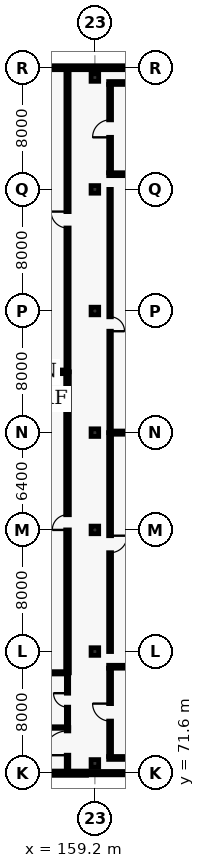
"""IFC4 building model, lengths in metres.
Left out: names, types, materials, properties, quantities, classifications, styles, units other than length and angle.
Written with IfcOpenShell. Run it as: python <this file> out.ifc"""

import sys

from ifc_helpers import new_model, si_unit, direction, frame, frame_2d, origin, origin_2d, place, context, subcontext, project, spatial, rectangle, extrude, element, fill, save


model = new_model("IFC4")
c1 = context("Model", 3, precision=1e-05, world=origin(), true_north=direction((0.0, 1.0)))
c2 = subcontext(c1, "Body", "Model", "MODEL_VIEW")
j1 = project(units=[si_unit("LENGTHUNIT", "METRE"), si_unit("PLANEANGLEUNIT", "RADIAN")], contexts=[c1])
p1 = place(None, origin())
s1 = spatial("IfcSite", under=j1, at=p1, CompositionType="ELEMENT")
p2 = place(p1, origin())
s2 = spatial("IfcBuilding", under=s1, at=p2, CompositionType="ELEMENT")
p3 = place(p2, frame((0.0, 0.0, 29.4)))
s3 = spatial("IfcBuildingStorey", under=s2, at=p3, CompositionType="ELEMENT", Elevation=29.4)
for number, where, z_axis, x_axis in (
    (1, (159.2, 72.24, 0.0), (0.0, 0.0, 1.0), (1.0, 0.0, 0.0)),
    (2, (159.2, 79.6, 0.0), (0.0, 0.0, 1.0), (1.0, 0.0, 0.0)),
    (3, (159.2, 87.6, 0.0), (0.0, 0.0, 1.0), (1.0, 0.0, 0.0)),
    (4, (159.2, 94.0, 0.0), (0.0, 0.0, 1.0), (1.0, 0.0, 0.0)),
    (5, (159.2, 102.0, 0.0), (0.0, 0.0, 1.0), (1.0, 0.0, 0.0)),
    (6, (159.2, 110.0, 0.0), (0.0, 0.0, 1.0), (1.0, 0.0, 0.0)),
    (7, (159.2, 117.36, 0.0), (0.0, 0.0, 1.0), (1.0, 0.0, 0.0)),
):
    element("IfcColumn", number, at=place(p3, frame(where, z_axis=z_axis, x_axis=x_axis)), inside=s3, PredefinedType="COLUMN", context=c2, shape_type="SweptSolid", body=[
        extrude(rectangle(XDim=0.5, YDim=0.5, at=origin_2d()), origin(), (0.0, 0.0, 1.0), 4.5),
    ])
p4 = place(p3, frame((152.8, 118.0, 0.0), z_axis=(0.0, 0.0, 1.0), x_axis=(1.0, 0.0, 0.0)))
e8 = element("IfcWall", 8, at=p4, inside=s3, PredefinedType="SOLIDWALL", context=c2, shape_type="SweptSolid", body=[
    extrude(rectangle(XDim=19.2, YDim=0.25, at=frame_2d((9.6, 0.0))), origin(), (0.0, 0.0, 1.0), 4.255),
])
p5 = place(p4, frame((0.75, 0.0, 0.9)))
e9 = element("IfcOpeningElement", 9, at=p5, cuts=e8, PredefinedType="OPENING", context=c2, shape_type="SweptSolid", body=[
    extrude(rectangle(XDim=1.6, YDim=1.65, at=frame_2d((0.8, 0.825))), frame((0.0, 0.135, 0.0), z_axis=(0.0, -1.0, 0.0), x_axis=(1.0, 0.0, 0.0)), (0.0, 0.0, 1.0), 0.27),
])
p6 = place(p4, frame((10.0, 0.0, 0.9)))
e10 = element("IfcOpeningElement", 10, at=p6, cuts=e8, PredefinedType="OPENING", context=c2, shape_type="SweptSolid", body=[
    extrude(rectangle(XDim=1.4, YDim=2.1, at=frame_2d((0.7, 1.05))), frame((0.0, 0.135, 0.0), z_axis=(0.0, -1.0, 0.0), x_axis=(1.0, 0.0, 0.0)), (0.0, 0.0, 1.0), 0.27),
])
p7 = place(p3, frame((172.0, 71.6, 0.0), z_axis=(0.0, 0.0, 1.0), x_axis=(-1.0, 0.0, 0.0)))
e11 = element("IfcWall", 11, at=p7, inside=s3, PredefinedType="SOLIDWALL", context=c2, shape_type="SweptSolid", body=[
    extrude(rectangle(XDim=19.2, YDim=0.275, at=frame_2d((9.6, 0.0))), origin(), (0.0, 0.0, 1.0), 4.255),
])
p8 = place(p7, frame((10.0, 0.0, 0.8)))
e12 = element("IfcOpeningElement", 12, at=p8, cuts=e11, PredefinedType="OPENING", context=c2, shape_type="SweptSolid", body=[
    extrude(rectangle(XDim=3.35, YDim=2.9, at=frame_2d((1.675, 1.45))), frame((0.0, 0.147, 0.0), z_axis=(0.0, -1.0, 0.0), x_axis=(1.0, 0.0, 0.0)), (0.0, 0.0, 1.0), 0.295),
])
for number, where, z_axis, x_axis in (
    (13, (152.8, 118.0, 4.5), (0.0, 0.0, 1.0), (1.0, 0.0, 0.0)),
    (14, (172.0, 71.6, 4.5), (0.0, 0.0, 1.0), (-1.0, 0.0, 0.0)),
):
    element("IfcWall", number, at=place(p3, frame(where, z_axis=z_axis, x_axis=x_axis)), inside=s3, PredefinedType="PARAPET", context=c2, shape_type="SweptSolid", body=[
        extrude(rectangle(XDim=19.2, YDim=0.22, at=frame_2d((9.6, 0.0))), origin(), (0.0, 0.0, 1.0), 0.95),
    ])
p9 = place(p3, frame((160.105, 72.6, 0.0), z_axis=(0.0, 0.0, 1.0), x_axis=(1.0, 0.0, 0.0)))
e15 = element("IfcWall", 15, at=p9, inside=s3, PredefinedType="PARTITIONING", context=c2, shape_type="SweptSolid", body=[
    extrude(rectangle(XDim=4.495, YDim=0.19, at=frame_2d((2.248, 0.0))), origin(), (0.0, 0.0, 1.0), 3.605),
])
p10 = place(p3, frame((160.105, 78.6, 0.0), z_axis=(0.0, 0.0, 1.0), x_axis=(1.0, 0.0, 0.0)))
e16 = element("IfcWall", 16, at=p10, inside=s3, PredefinedType="PARTITIONING", context=c2, shape_type="SweptSolid", body=[
    extrude(rectangle(XDim=4.495, YDim=0.19, at=frame_2d((2.248, 0.0))), origin(), (0.0, 0.0, 1.0), 4.255),
])
p11 = place(p3, frame((160.2, 72.695, 0.0), z_axis=(0.0, 0.0, 1.0), x_axis=(0.0, 1.0, 0.0)))
e17 = element("IfcWall", 17, at=p11, inside=s3, PredefinedType="PARTITIONING", context=c2, shape_type="SweptSolid", body=[
    extrude(rectangle(XDim=5.81, YDim=0.19, at=frame_2d((2.905, 0.0))), origin(), (0.0, 0.0, 1.0), 4.255),
])
p12 = place(p11, frame((2.33, 0.0, 0.0)))
e18 = element("IfcOpeningElement", 18, at=p12, cuts=e17, PredefinedType="OPENING", context=c2, shape_type="SweptSolid", body=[
    extrude(rectangle(XDim=1.15, YDim=2.2, at=frame_2d((0.575, 1.1))), frame((0.0, 0.105, 0.0), z_axis=(0.0, -1.0, 0.0), x_axis=(1.0, 0.0, 0.0)), (0.0, 0.0, 1.0), 0.21),
])
p13 = place(p3, frame((160.105, 111.0, 0.0), z_axis=(0.0, 0.0, 1.0), x_axis=(1.0, 0.0, 0.0)))
e19 = element("IfcWall", 19, at=p13, inside=s3, PredefinedType="PARTITIONING", context=c2, shape_type="SweptSolid", body=[
    extrude(rectangle(XDim=4.495, YDim=0.19, at=frame_2d((2.248, 0.0))), origin(), (0.0, 0.0, 1.0), 4.255),
])
p14 = place(p3, frame((160.105, 117.0, 0.0), z_axis=(0.0, 0.0, 1.0), x_axis=(1.0, 0.0, 0.0)))
e20 = element("IfcWall", 20, at=p14, inside=s3, PredefinedType="PARTITIONING", context=c2, shape_type="SweptSolid", body=[
    extrude(rectangle(XDim=4.495, YDim=0.19, at=frame_2d((2.248, 0.0))), origin(), (0.0, 0.0, 1.0), 3.605),
])
p15 = place(p3, frame((160.2, 111.095, 0.0), z_axis=(0.0, 0.0, 1.0), x_axis=(0.0, 1.0, 0.0)))
e21 = element("IfcWall", 21, at=p15, inside=s3, PredefinedType="PARTITIONING", context=c2, shape_type="SweptSolid", body=[
    extrude(rectangle(XDim=5.81, YDim=0.19, at=frame_2d((2.905, 0.0))), origin(), (0.0, 0.0, 1.0), 4.255),
])
p16 = place(p15, frame((2.33, 0.0, 0.0)))
e22 = element("IfcOpeningElement", 22, at=p16, cuts=e21, PredefinedType="OPENING", context=c2, shape_type="SweptSolid", body=[
    extrude(rectangle(XDim=1.15, YDim=2.2, at=frame_2d((0.575, 1.1))), frame((0.0, 0.105, 0.0), z_axis=(0.0, -1.0, 0.0), x_axis=(1.0, 0.0, 0.0)), (0.0, 0.0, 1.0), 0.21),
])
p17 = place(p3, frame((157.4, 71.6, 0.0), z_axis=(0.0, 0.0, 1.0), x_axis=(0.0, 1.0, 0.0)))
e23 = element("IfcWall", 23, at=p17, inside=s3, PredefinedType="PARTITIONING", context=c2, shape_type="SweptSolid", body=[
    extrude(rectangle(XDim=3.0, YDim=0.165, at=frame_2d((1.5, 0.0))), origin(), (0.0, 0.0, 1.0), 4.255),
])
p18 = place(p17, frame((1.18, 0.0, 0.0)))
e24 = element("IfcOpeningElement", 24, at=p18, cuts=e23, PredefinedType="OPENING", context=c2, shape_type="SweptSolid", body=[
    extrude(rectangle(XDim=1.6, YDim=2.3, at=frame_2d((0.8, 1.15))), frame((0.0, 0.093, 0.0), z_axis=(0.0, -1.0, 0.0), x_axis=(1.0, 0.0, 0.0)), (0.0, 0.0, 1.0), 0.185),
])
p19 = place(p3, frame((157.4, 74.6, 0.0), z_axis=(0.0, 0.0, 1.0), x_axis=(0.0, 1.0, 0.0)))
e25 = element("IfcWall", 25, at=p19, inside=s3, PredefinedType="PARTITIONING", context=c2, shape_type="SweptSolid", body=[
    extrude(rectangle(XDim=3.6, YDim=0.15, at=frame_2d((1.8, 0.0))), origin(), (0.0, 0.0, 1.0), 4.255),
])
p20 = place(p19, frame((1.34, 0.0, 0.0)))
e26 = element("IfcOpeningElement", 26, at=p20, cuts=e25, PredefinedType="OPENING", context=c2, shape_type="SweptSolid", body=[
    extrude(rectangle(XDim=0.92, YDim=2.1, at=frame_2d((0.46, 1.05))), frame((0.0, 0.085, 0.0), z_axis=(0.0, -1.0, 0.0), x_axis=(1.0, 0.0, 0.0)), (0.0, 0.0, 1.0), 0.17),
])
p21 = place(p3, frame((157.4, 78.2, 0.0), z_axis=(0.0, 0.0, 1.0), x_axis=(0.0, 1.0, 0.0)))
e27 = element("IfcWall", 27, at=p21, inside=s3, PredefinedType="PARTITIONING", context=c2, shape_type="SweptSolid", body=[
    extrude(rectangle(XDim=19.8, YDim=0.24, at=frame_2d((9.9, 0.0))), origin(), (0.0, 0.0, 1.0), 4.255),
])
p22 = place(p21, frame((9.4, 0.0, 0.0)))
e28 = element("IfcOpeningElement", 28, at=p22, cuts=e27, PredefinedType="OPENING", context=c2, shape_type="SweptSolid", body=[
    extrude(rectangle(XDim=1.0, YDim=2.1, at=frame_2d((0.5, 1.05))), frame((0.0, 0.13, 0.0), z_axis=(0.0, -1.0, 0.0), x_axis=(1.0, 0.0, 0.0)), (0.0, 0.0, 1.0), 0.26),
])
p23 = place(p3, frame((157.4, 98.0, 0.0), z_axis=(0.0, 0.0, 1.0), x_axis=(0.0, 1.0, 0.0)))
e29 = element("IfcWall", 29, at=p23, inside=s3, PredefinedType="PARTITIONING", context=c2, shape_type="SweptSolid", body=[
    extrude(rectangle(XDim=20.0, YDim=0.21, at=frame_2d((10.0, 0.0))), origin(), (0.0, 0.0, 1.0), 4.255),
])
p24 = place(p23, frame((9.46, 0.0, 0.0)))
e30 = element("IfcOpeningElement", 30, at=p24, cuts=e29, PredefinedType="OPENING", context=c2, shape_type="SweptSolid", body=[
    extrude(rectangle(XDim=1.08, YDim=2.15, at=frame_2d((0.54, 1.075))), frame((0.0, 0.115, 0.0), z_axis=(0.0, -1.0, 0.0), x_axis=(1.0, 0.0, 0.0)), (0.0, 0.0, 1.0), 0.23),
])
p25 = place(p3, frame((160.2, 94.0, 0.0), z_axis=(0.0, 0.0, 1.0), x_axis=(0.0, -1.0, 0.0)))
e31 = element("IfcWall", 31, at=p25, inside=s3, PredefinedType="PARTITIONING", context=c2, shape_type="SweptSolid", body=[
    extrude(rectangle(XDim=14.4, YDim=0.19, at=frame_2d((7.2, 0.0))), origin(), (0.0, 0.0, 1.0), 4.255),
])
p26 = place(p25, frame((6.78, 0.0, 0.0)))
e32 = element("IfcOpeningElement", 32, at=p26, cuts=e31, PredefinedType="OPENING", context=c2, shape_type="SweptSolid", body=[
    extrude(rectangle(XDim=1.12, YDim=2.15, at=frame_2d((0.56, 1.075))), frame((0.0, 0.105, 0.0), z_axis=(0.0, -1.0, 0.0), x_axis=(1.0, 0.0, 0.0)), (0.0, 0.0, 1.0), 0.21),
])
p27 = place(p3, frame((160.2, 110.0, 0.0), z_axis=(0.0, 0.0, 1.0), x_axis=(0.0, -1.0, 0.0)))
e33 = element("IfcWall", 33, at=p27, inside=s3, PredefinedType="PARTITIONING", context=c2, shape_type="SweptSolid", body=[
    extrude(rectangle(XDim=16.0, YDim=0.165, at=frame_2d((8.0, 0.0))), origin(), (0.0, 0.0, 1.0), 4.255),
])
p28 = place(p27, frame((8.38, 0.0, 0.0)))
e34 = element("IfcOpeningElement", 34, at=p28, cuts=e33, PredefinedType="OPENING", context=c2, shape_type="SweptSolid", body=[
    extrude(rectangle(XDim=0.95, YDim=2.1, at=frame_2d((0.475, 1.05))), frame((0.0, 0.093, 0.0), z_axis=(0.0, -1.0, 0.0), x_axis=(1.0, 0.0, 0.0)), (0.0, 0.0, 1.0), 0.185),
])
p29 = place(p3, frame((154.2, 74.6, 0.0), z_axis=(0.0, 0.0, 1.0), x_axis=(1.0, 0.0, 0.0)))
e35 = element("IfcWall", 35, at=p29, inside=s3, PredefinedType="PARTITIONING", context=c2, shape_type="SweptSolid", body=[
    extrude(rectangle(XDim=3.2, YDim=0.1, at=frame_2d((1.6, 0.0))), origin(), (0.0, 0.0, 1.0), 4.255),
])
p30 = place(p3, frame((152.8, 78.2, 0.0), z_axis=(0.0, 0.0, 1.0), x_axis=(1.0, 0.0, 0.0)))
e36 = element("IfcWall", 36, at=p30, inside=s3, PredefinedType="PARTITIONING", context=c2, shape_type="SweptSolid", body=[
    extrude(rectangle(XDim=4.6, YDim=0.15, at=frame_2d((2.3, 0.0))), origin(), (0.0, 0.0, 1.0), 4.255),
])
p31 = place(p3, frame((152.8, 98.0, 0.0), z_axis=(0.0, 0.0, 1.0), x_axis=(1.0, 0.0, 0.0)))
e37 = element("IfcWall", 37, at=p31, inside=s3, PredefinedType="PARTITIONING", context=c2, shape_type="SweptSolid", body=[
    extrude(rectangle(XDim=4.6, YDim=0.24, at=frame_2d((2.3, 0.0))), origin(), (0.0, 0.0, 1.0), 4.255),
])
p32 = place(p3, frame((160.2, 94.0, 0.0), z_axis=(0.0, 0.0, 1.0), x_axis=(1.0, 0.0, 0.0)))
e38 = element("IfcWall", 38, at=p32, inside=s3, PredefinedType="PARTITIONING", context=c2, shape_type="SweptSolid", body=[
    extrude(rectangle(XDim=4.148, YDim=0.21, at=frame_2d((2.074, 0.0))), origin(), (0.0, 0.0, 1.0), 3.605),
])
p33 = place(p8, origin())
e39 = element("IfcWindow", 39, at=p33, inside=s3, PartitioningType="SINGLE_PANEL", PredefinedType="WINDOW", context=c2, shape_type="SweptSolid", body=[
    extrude(rectangle(XDim=3.35, YDim=2.9, at=frame_2d((1.675, 1.45))), frame((0.0, 0.03, 0.0), z_axis=(0.0, -1.0, 0.0), x_axis=(1.0, 0.0, 0.0)), (0.0, 0.0, 1.0), 0.06),
])
fill(e12, e39)
p34 = place(p12, origin())
e40 = element("IfcDoor", 40, at=p34, inside=s3, OperationType="SINGLE_SWING_RIGHT", PredefinedType="DOOR", context=c2, shape_type="SweptSolid", body=[
    extrude(rectangle(XDim=1.15, YDim=2.2, at=frame_2d((0.575, 1.1))), frame((0.0, 0.025, 0.0), z_axis=(0.0, -1.0, 0.0), x_axis=(1.0, 0.0, 0.0)), (0.0, 0.0, 1.0), 0.05),
])
fill(e18, e40)
p35 = place(p16, origin())
e41 = element("IfcDoor", 41, at=p35, inside=s3, OperationType="SINGLE_SWING_LEFT", PredefinedType="DOOR", context=c2, shape_type="SweptSolid", body=[
    extrude(rectangle(XDim=1.15, YDim=2.2, at=frame_2d((0.575, 1.1))), frame((0.0, 0.025, 0.0), z_axis=(0.0, -1.0, 0.0), x_axis=(1.0, 0.0, 0.0)), (0.0, 0.0, 1.0), 0.05),
])
fill(e22, e41)
p36 = place(p18, origin())
e42 = element("IfcDoor", 42, at=p36, inside=s3, OperationType="SINGLE_SWING_LEFT", PredefinedType="DOOR", context=c2, shape_type="SweptSolid", body=[
    extrude(rectangle(XDim=1.6, YDim=2.3, at=frame_2d((0.8, 1.15))), frame((0.0, 0.025, 0.0), z_axis=(0.0, -1.0, 0.0), x_axis=(1.0, 0.0, 0.0)), (0.0, 0.0, 1.0), 0.05),
])
fill(e24, e42)
p37 = place(p20, origin())
e43 = element("IfcDoor", 43, at=p37, inside=s3, OperationType="SINGLE_SWING_RIGHT", PredefinedType="DOOR", context=c2, shape_type="SweptSolid", body=[
    extrude(rectangle(XDim=0.92, YDim=2.1, at=frame_2d((0.46, 1.05))), frame((0.0, 0.025, 0.0), z_axis=(0.0, -1.0, 0.0), x_axis=(1.0, 0.0, 0.0)), (0.0, 0.0, 1.0), 0.05),
])
fill(e26, e43)
p38 = place(p22, origin())
e44 = element("IfcDoor", 44, at=p38, inside=s3, OperationType="SINGLE_SWING_LEFT", PredefinedType="DOOR", context=c2, shape_type="SweptSolid", body=[
    extrude(rectangle(XDim=1.0, YDim=2.1, at=frame_2d((0.5, 1.05))), frame((0.0, 0.025, 0.0), z_axis=(0.0, -1.0, 0.0), x_axis=(1.0, 0.0, 0.0)), (0.0, 0.0, 1.0), 0.05),
])
fill(e28, e44)
p39 = place(p24, origin())
e45 = element("IfcDoor", 45, at=p39, inside=s3, OperationType="SINGLE_SWING_RIGHT", PredefinedType="DOOR", context=c2, shape_type="SweptSolid", body=[
    extrude(rectangle(XDim=1.08, YDim=2.15, at=frame_2d((0.54, 1.075))), frame((0.0, 0.025, 0.0), z_axis=(0.0, -1.0, 0.0), x_axis=(1.0, 0.0, 0.0)), (0.0, 0.0, 1.0), 0.05),
])
fill(e30, e45)
p40 = place(p26, origin())
e46 = element("IfcDoor", 46, at=p40, inside=s3, OperationType="SINGLE_SWING_LEFT", PredefinedType="DOOR", context=c2, shape_type="SweptSolid", body=[
    extrude(rectangle(XDim=1.12, YDim=2.15, at=frame_2d((0.56, 1.075))), frame((0.0, 0.025, 0.0), z_axis=(0.0, -1.0, 0.0), x_axis=(1.0, 0.0, 0.0)), (0.0, 0.0, 1.0), 0.05),
])
fill(e32, e46)
p41 = place(p28, origin())
e47 = element("IfcDoor", 47, at=p41, inside=s3, OperationType="SINGLE_SWING_RIGHT", PredefinedType="DOOR", context=c2, shape_type="SweptSolid", body=[
    extrude(rectangle(XDim=0.95, YDim=2.1, at=frame_2d((0.475, 1.05))), frame((0.0, 0.025, 0.0), z_axis=(0.0, -1.0, 0.0), x_axis=(1.0, 0.0, 0.0)), (0.0, 0.0, 1.0), 0.05),
])
fill(e34, e47)
save(model, sys.argv[1])
